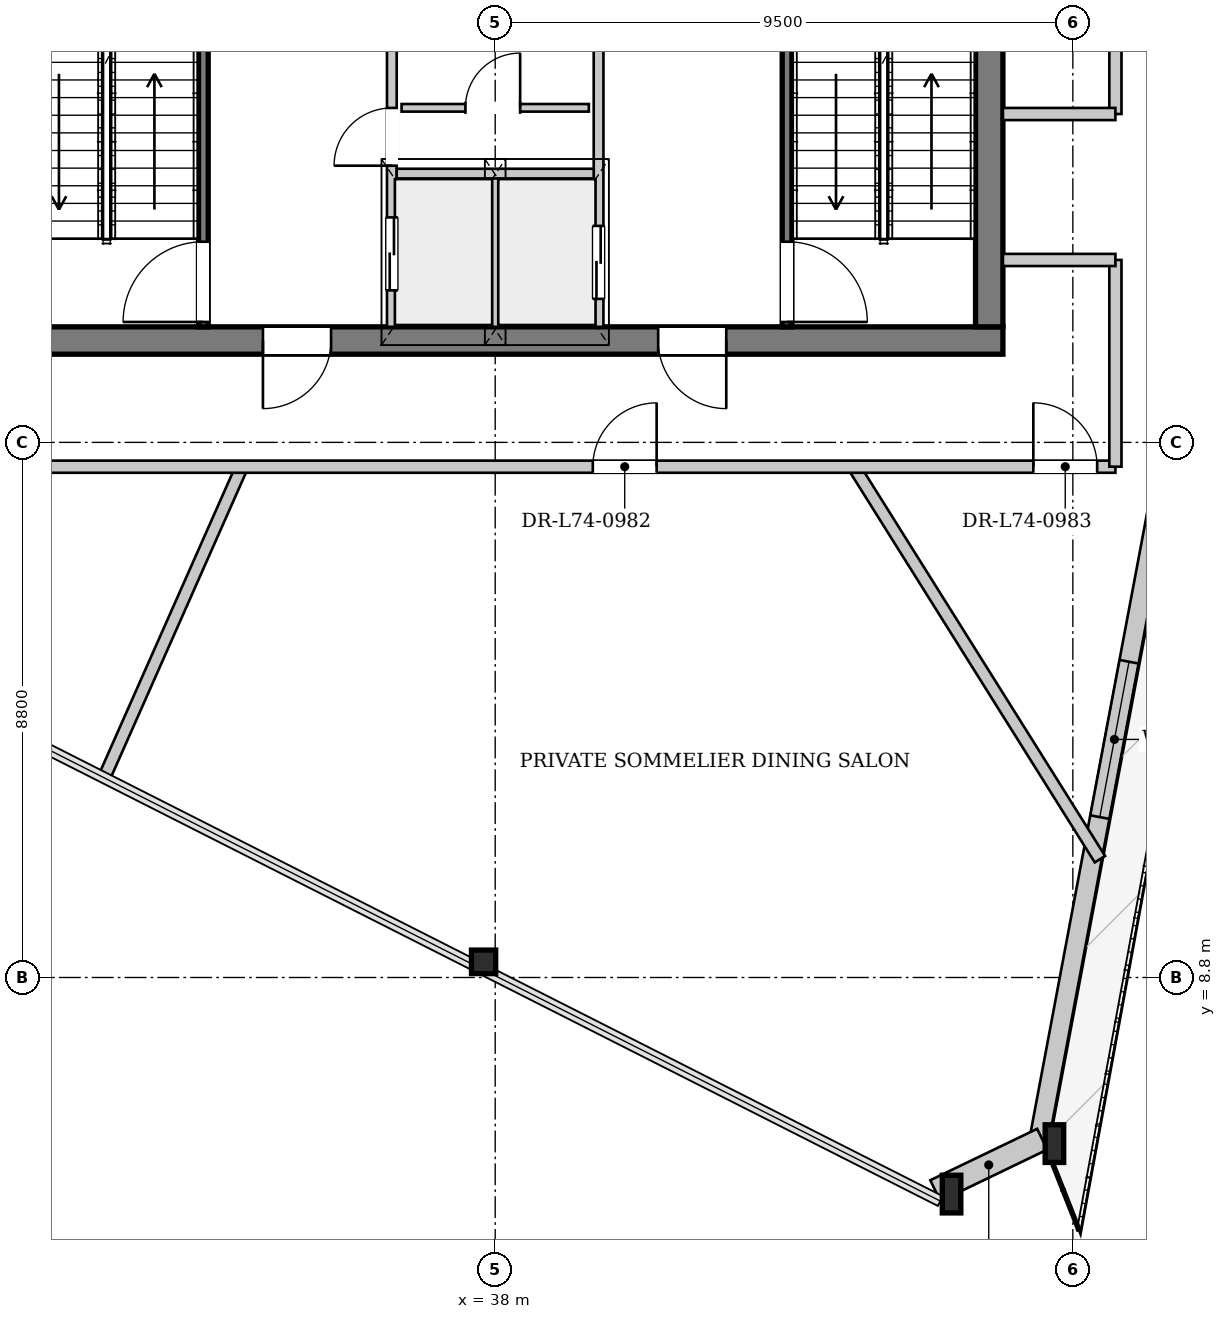
"""IFC4 building model, lengths in metres.
Left out: names, types, materials, properties, quantities, classifications, styles, units other than length and angle.
Written with IfcOpenShell. Run it as: python <this file> out.ifc"""

import sys

from ifc_helpers import new_model, si_unit, direction, frame, frame_2d, origin, origin_2d, place, context, subcontext, project, spatial, rectangle, i_section, extrude, source, transform, mapped, element, fill, save


model = new_model("IFC4")
c1 = context("Model", 3, precision=1e-05, world=origin(), true_north=direction((0.0, 1.0)))
c2 = subcontext(c1, "Body", "Model", "MODEL_VIEW")
j1 = project(units=[si_unit("LENGTHUNIT", "METRE"), si_unit("PLANEANGLEUNIT", "RADIAN")], contexts=[c1])
p1 = place(None, origin())
s1 = spatial("IfcSite", under=j1, at=p1, CompositionType="ELEMENT")
p2 = place(p1, origin())
s2 = spatial("IfcBuilding", under=s1, at=p2, CompositionType="ELEMENT")
p3 = place(p2, frame((0.0, 0.0, 277.7)))
s3 = spatial("IfcBuildingStorey", under=s2, at=p3, CompositionType="ELEMENT", Elevation=277.7)
m1 = source(origin(), c2, "Body", "SweptSolid", [
    extrude(i_section(OverallWidth=0.398, OverallDepth=0.387, WebThickness=0.019, FlangeThickness=0.029, at=origin_2d()), origin(), (0.0, 0.0, 1.0), 3.949),
])
p4 = place(p3, frame((37.649, 9.006, 0.0), z_axis=(0.081104376536, 0.025777839189, 0.996372211131), x_axis=(-0.302903819807, 0.953021130902, 0.0)))
e1 = element("IfcColumn", 1, at=p4, inside=s3, PredefinedType="COLUMN", context=c2, shape_type="MappedRepresentation", body=[
    mapped(m1, transform((0.0, 0.0, 0.0), x_axis=(1.0, 0.0, 0.0), y_axis=(0.0, 1.0, 0.0), z_axis=(0.0, 0.0, 1.0), scale=1.0)),
])
m2 = source(origin(), c2, "Body", "SweptSolid", [
    extrude(i_section(OverallWidth=0.305, OverallDepth=0.62, WebThickness=0.021, FlangeThickness=0.04, at=origin_2d()), origin(), (0.0, 0.0, 1.0), 3.959),
])
p5 = place(p3, frame((45.321, 5.123, 0.0), z_axis=(0.093241063797, 0.057967328022, 0.993954673466), x_axis=(-0.527977918336, 0.84925809843, 0.0)))
e2 = element("IfcColumn", 2, at=p5, inside=s3, PredefinedType="COLUMN", context=c2, shape_type="MappedRepresentation", body=[
    mapped(m2, transform((0.0, 0.0, 0.0), x_axis=(1.0, 0.0, 0.0), y_axis=(0.0, 1.0, 0.0), z_axis=(0.0, 0.0, 1.0), scale=1.0)),
])
m3 = source(origin(), c2, "Body", "SweptSolid", [
    extrude(i_section(OverallWidth=0.305, OverallDepth=0.62, WebThickness=0.021, FlangeThickness=0.04, at=origin_2d()), origin(), (0.0, 0.0, 1.0), 3.947),
])
p6 = place(p3, frame((47.078, 5.969, 0.0), z_axis=(0.060366430178, 0.050222890681, 0.996912009838), x_axis=(-0.639564408319, 0.768737515418, 0.0)))
e3 = element("IfcColumn", 3, at=p6, inside=s3, PredefinedType="COLUMN", context=c2, shape_type="MappedRepresentation", body=[
    mapped(m3, transform((0.0, 0.0, 0.0), x_axis=(1.0, 0.0, 0.0), y_axis=(0.0, 1.0, 0.0), z_axis=(0.0, 0.0, 1.0), scale=1.0)),
])
p7 = place(p3, frame((50.997, 27.672, 0.0), z_axis=(0.0, 0.0, 1.0), x_axis=(-0.184819886047, -0.982772409931, 0.0)))
e4 = element("IfcWall", 4, at=p7, inside=s3, PredefinedType="SOLIDWALL", context=c2, shape_type="SweptSolid", body=[
    extrude(rectangle(XDim=22.053, YDim=0.32, at=frame_2d((11.027, 0.0))), origin(), (0.0, 0.0, 1.0), 3.462),
])
p8 = place(p7, frame((6.307, 0.0, 0.0)))
e5 = element("IfcOpeningElement", 5, at=p8, cuts=e4, PredefinedType="OPENING", context=c2, shape_type="SweptSolid", body=[
    extrude(rectangle(XDim=1.5, YDim=2.3, at=frame_2d((0.75, 1.15))), frame((0.0, 0.17, 0.0), z_axis=(0.0, -1.0, 0.0), x_axis=(1.0, 0.0, 0.0)), (0.0, 0.0, 1.0), 0.34),
])
p9 = place(p7, frame((13.919, 0.0, 0.65)))
e6 = element("IfcOpeningElement", 6, at=p9, cuts=e4, PredefinedType="OPENING", context=c2, shape_type="SweptSolid", body=[
    extrude(rectangle(XDim=2.6, YDim=2.35, at=frame_2d((1.3, 1.175))), frame((0.0, 0.17, 0.0), z_axis=(0.0, -1.0, 0.0), x_axis=(1.0, 0.0, 0.0)), (0.0, 0.0, 1.0), 0.34),
])
p10 = place(p3, frame((46.996, 6.14, 0.0), z_axis=(0.0, 0.0, 1.0), x_axis=(-0.901133930153, -0.43354081691, 0.0)))
e7 = element("IfcWall", 7, at=p10, inside=s3, PredefinedType="SOLIDWALL", context=c2, shape_type="SweptSolid", body=[
    extrude(rectangle(XDim=1.95, YDim=0.38, at=frame_2d((0.975, 0.0))), origin(), (0.0, 0.0, 1.0), 3.462),
])
p11 = place(p3, frame((46.35, 19.275, 0.0), z_axis=(0.0, 0.0, 1.0), x_axis=(-1.0, 0.0, 0.0)))
e8 = element("IfcWall", 8, at=p11, inside=s3, PredefinedType="SHEAR", context=c2, shape_type="SweptSolid", body=[
    extrude(rectangle(XDim=16.7, YDim=0.45, at=frame_2d((8.35, 0.0))), origin(), (0.0, 0.0, 1.0), 3.92),
])
p12 = place(p11, frame((4.55, 0.0, 0.0)))
e9 = element("IfcOpeningElement", 9, at=p12, cuts=e8, PredefinedType="OPENING", context=c2, shape_type="SweptSolid", body=[
    extrude(rectangle(XDim=1.12, YDim=2.25, at=frame_2d((0.56, 1.125))), frame((0.0, 0.235, 0.0), z_axis=(0.0, -1.0, 0.0), x_axis=(1.0, 0.0, 0.0)), (0.0, 0.0, 1.0), 0.47),
])
p13 = place(p11, frame((11.05, 0.0, 0.0)))
e10 = element("IfcOpeningElement", 10, at=p13, cuts=e8, PredefinedType="OPENING", context=c2, shape_type="SweptSolid", body=[
    extrude(rectangle(XDim=1.12, YDim=2.25, at=frame_2d((0.56, 1.125))), frame((0.0, 0.235, 0.0), z_axis=(0.0, -1.0, 0.0), x_axis=(1.0, 0.0, 0.0)), (0.0, 0.0, 1.0), 0.47),
])
p14 = place(p3, frame((46.125, 33.7, 0.0), z_axis=(0.0, 0.0, 1.0), x_axis=(0.0, -1.0, 0.0)))
e11 = element("IfcWall", 11, at=p14, inside=s3, PredefinedType="SHEAR", context=c2, shape_type="SweptSolid", body=[
    extrude(rectangle(XDim=14.2, YDim=0.45, at=frame_2d((7.1, 0.0))), origin(), (0.0, 0.0, 1.0), 3.92),
])
p15 = place(p14, frame((5.18, 0.0, 0.0)))
e12 = element("IfcOpeningElement", 12, at=p15, cuts=e11, PredefinedType="OPENING", context=c2, shape_type="SweptSolid", body=[
    extrude(rectangle(XDim=1.6, YDim=2.2, at=frame_2d((0.8, 1.1))), frame((0.0, 0.235, 0.0), z_axis=(0.0, -1.0, 0.0), x_axis=(1.0, 0.0, 0.0)), (0.0, 0.0, 1.0), 0.47),
])
p16 = place(p14, frame((2.05, 0.0, 0.0)))
e13 = element("IfcOpeningElement", 13, at=p16, cuts=e11, PredefinedType="OPENING", context=c2, shape_type="SweptSolid", body=[
    extrude(rectangle(XDim=0.95, YDim=2.1, at=frame_2d((0.475, 1.05))), frame((0.0, 0.235, 0.0), z_axis=(0.0, -1.0, 0.0), x_axis=(1.0, 0.0, 0.0)), (0.0, 0.0, 1.0), 0.47),
])
p17 = place(p3, frame((33.2, 19.5, 0.0), z_axis=(0.0, 0.0, 1.0), x_axis=(0.0, 1.0, 0.0)))
e14 = element("IfcWall", 14, at=p17, inside=s3, PredefinedType="PARTITIONING", context=c2, shape_type="SweptSolid", body=[
    extrude(rectangle(XDim=7.46, YDim=0.16, at=frame_2d((3.73, 0.0))), origin(), (0.0, 0.0, 1.0), 3.92),
])
p18 = place(p17, frame((0.08, 0.0, 0.0)))
e15 = element("IfcOpeningElement", 15, at=p18, cuts=e14, PredefinedType="OPENING", context=c2, shape_type="SweptSolid", body=[
    extrude(rectangle(XDim=1.32, YDim=2.2, at=frame_2d((0.66, 1.1))), frame((0.0, 0.09, 0.0), z_axis=(0.0, -1.0, 0.0), x_axis=(1.0, 0.0, 0.0)), (0.0, 0.0, 1.0), 0.18),
])
p19 = place(p3, frame((42.8, 26.96, 0.0), z_axis=(0.0, 0.0, 1.0), x_axis=(0.0, -1.0, 0.0)))
e16 = element("IfcWall", 16, at=p19, inside=s3, PredefinedType="PARTITIONING", context=c2, shape_type="SweptSolid", body=[
    extrude(rectangle(XDim=7.46, YDim=0.16, at=frame_2d((3.73, 0.0))), origin(), (0.0, 0.0, 1.0), 3.92),
])
p20 = place(p19, frame((6.06, 0.0, 0.0)))
e17 = element("IfcOpeningElement", 17, at=p20, cuts=e16, PredefinedType="OPENING", context=c2, shape_type="SweptSolid", body=[
    extrude(rectangle(XDim=1.32, YDim=2.2, at=frame_2d((0.66, 1.1))), frame((0.0, 0.09, 0.0), z_axis=(0.0, -1.0, 0.0), x_axis=(1.0, 0.0, 0.0)), (0.0, 0.0, 1.0), 0.18),
])
p21 = place(p3, frame((36.3, 19.5, 0.0), z_axis=(0.0, 0.0, 1.0), x_axis=(0.0, 1.0, 0.0)))
e18 = element("IfcWall", 18, at=p21, inside=s3, PredefinedType="PARTITIONING", context=c2, shape_type="SweptSolid", body=[
    extrude(rectangle(XDim=4.78, YDim=0.16, at=frame_2d((2.39, 0.0))), origin(), (0.0, 0.0, 1.0), 3.92),
])
p22 = place(p21, frame((0.6, 0.0, 0.0)))
e19 = element("IfcOpeningElement", 19, at=p22, cuts=e18, PredefinedType="OPENING", context=c2, shape_type="SweptSolid", body=[
    extrude(rectangle(XDim=1.2, YDim=2.2, at=frame_2d((0.6, 1.1))), frame((0.0, 0.09, 0.0), z_axis=(0.0, -1.0, 0.0), x_axis=(1.0, 0.0, 0.0)), (0.0, 0.0, 1.0), 0.18),
])
p23 = place(p21, frame((2.65, 0.0, 0.0)))
e20 = element("IfcOpeningElement", 20, at=p23, cuts=e18, PredefinedType="OPENING", context=c2, shape_type="SweptSolid", body=[
    extrude(rectangle(XDim=0.95, YDim=2.1, at=frame_2d((0.475, 1.05))), frame((0.0, 0.09, 0.0), z_axis=(0.0, -1.0, 0.0), x_axis=(1.0, 0.0, 0.0)), (0.0, 0.0, 1.0), 0.18),
])
p24 = place(p3, frame((39.7, 24.28, 0.0), z_axis=(0.0, 0.0, 1.0), x_axis=(0.0, -1.0, 0.0)))
e21 = element("IfcWall", 21, at=p24, inside=s3, PredefinedType="PARTITIONING", context=c2, shape_type="SweptSolid", body=[
    extrude(rectangle(XDim=4.78, YDim=0.16, at=frame_2d((2.39, 0.0))), origin(), (0.0, 0.0, 1.0), 3.92),
])
p25 = place(p24, frame((3.12, 0.0, 0.0)))
e22 = element("IfcOpeningElement", 22, at=p25, cuts=e21, PredefinedType="OPENING", context=c2, shape_type="SweptSolid", body=[
    extrude(rectangle(XDim=1.2, YDim=2.2, at=frame_2d((0.6, 1.1))), frame((0.0, 0.09, 0.0), z_axis=(0.0, -1.0, 0.0), x_axis=(1.0, 0.0, 0.0)), (0.0, 0.0, 1.0), 0.18),
])
p26 = place(p3, frame((38.0, 19.5, 0.0), z_axis=(0.0, 0.0, 1.0), x_axis=(0.0, 1.0, 0.0)))
e23 = element("IfcWall", 23, at=p26, inside=s3, PredefinedType="PARTITIONING", context=c2, shape_type="SweptSolid", body=[
    extrude(rectangle(XDim=2.46, YDim=0.125, at=frame_2d((1.23, 0.0))), origin(), (0.0, 0.0, 1.0), 3.92),
])
p27 = place(p3, frame((36.38, 22.02, 0.0), z_axis=(0.0, 0.0, 1.0), x_axis=(1.0, 0.0, 0.0)))
e24 = element("IfcWall", 24, at=p27, inside=s3, PredefinedType="PARTITIONING", context=c2, shape_type="SweptSolid", body=[
    extrude(rectangle(XDim=3.24, YDim=0.16, at=frame_2d((1.62, 0.0))), origin(), (0.0, 0.0, 1.0), 3.92),
])
p28 = place(p3, frame((36.46, 23.102, 0.0), z_axis=(0.0, 0.0, 1.0), x_axis=(1.0, 0.0, 0.0)))
e25 = element("IfcWall", 25, at=p28, inside=s3, PredefinedType="PARTITIONING", context=c2, shape_type="SweptSolid", body=[
    extrude(rectangle(XDim=3.08, YDim=0.125, at=frame_2d((1.54, 0.0))), origin(), (0.0, 0.0, 1.0), 3.92),
])
p29 = place(p28, frame((1.05, 0.0, 0.0)))
e26 = element("IfcOpeningElement", 26, at=p29, cuts=e25, PredefinedType="OPENING", context=c2, shape_type="SweptSolid", body=[
    extrude(rectangle(XDim=0.9, YDim=2.1, at=frame_2d((0.45, 1.05))), frame((0.0, 0.073, 0.0), z_axis=(0.0, -1.0, 0.0), x_axis=(1.0, 0.0, 0.0)), (0.0, 0.0, 1.0), 0.145),
])
p30 = place(p3, frame((33.834, 17.2, 0.0), z_axis=(0.0, 0.0, 1.0), x_axis=(-0.405145139192, -0.914252381014, 0.0)))
e27 = element("IfcWall", 27, at=p30, inside=s3, PredefinedType="PARTITIONING", context=c2, shape_type="SweptSolid", body=[
    extrude(rectangle(XDim=5.566, YDim=0.2, at=frame_2d((2.783, 0.0))), origin(), (0.0, 0.0, 1.0), 3.92),
])
p31 = place(p3, frame((43.896, 17.2, 0.0), z_axis=(0.0, 0.0, 1.0), x_axis=(0.531409475287, -0.847115086382, 0.0)))
e28 = element("IfcWall", 28, at=p31, inside=s3, PredefinedType="PARTITIONING", context=c2, shape_type="SweptSolid", body=[
    extrude(rectangle(XDim=7.619, YDim=0.2, at=frame_2d((3.81, 0.0))), origin(), (0.0, 0.0, 1.0), 3.92),
])
p32 = place(p3, frame((27.8, 17.2, 0.0), z_axis=(0.0, 0.0, 1.0), x_axis=(1.0, 0.0, 0.0)))
e29 = element("IfcWall", 29, at=p32, inside=s3, PredefinedType="PARTITIONING", context=c2, shape_type="SweptSolid", body=[
    extrude(rectangle(XDim=20.4, YDim=0.2, at=frame_2d((10.2, 0.0))), origin(), (0.0, 0.0, 1.0), 3.92),
])
p33 = place(p32, frame((0.3, 0.0, 0.0)))
e30 = element("IfcOpeningElement", 30, at=p33, cuts=e29, PredefinedType="OPENING", context=c2, shape_type="SweptSolid", body=[
    extrude(rectangle(XDim=1.05, YDim=2.2, at=frame_2d((0.525, 1.1))), frame((0.0, 0.11, 0.0), z_axis=(0.0, -1.0, 0.0), x_axis=(1.0, 0.0, 0.0)), (0.0, 0.0, 1.0), 0.22),
])
p34 = place(p32, frame((11.805, 0.0, 0.0)))
e31 = element("IfcOpeningElement", 31, at=p34, cuts=e29, PredefinedType="OPENING", context=c2, shape_type="SweptSolid", body=[
    extrude(rectangle(XDim=1.05, YDim=2.2, at=frame_2d((0.525, 1.1))), frame((0.0, 0.11, 0.0), z_axis=(0.0, -1.0, 0.0), x_axis=(1.0, 0.0, 0.0)), (0.0, 0.0, 1.0), 0.22),
])
p35 = place(p32, frame((19.05, 0.0, 0.0)))
e32 = element("IfcOpeningElement", 32, at=p35, cuts=e29, PredefinedType="OPENING", context=c2, shape_type="SweptSolid", body=[
    extrude(rectangle(XDim=1.05, YDim=2.2, at=frame_2d((0.525, 1.1))), frame((0.0, 0.11, 0.0), z_axis=(0.0, -1.0, 0.0), x_axis=(1.0, 0.0, 0.0)), (0.0, 0.0, 1.0), 0.22),
])
p36 = place(p3, frame((48.2, 17.2, 0.0), z_axis=(0.0, 0.0, 1.0), x_axis=(0.0, 1.0, 0.0)))
e33 = element("IfcWall", 33, at=p36, inside=s3, PredefinedType="PARTITIONING", context=c2, shape_type="SweptSolid", body=[
    extrude(rectangle(XDim=3.4, YDim=0.2, at=frame_2d((1.7, 0.0))), origin(), (0.0, 0.0, 1.0), 3.92),
])
p37 = place(p3, frame((46.35, 20.6, 0.0), z_axis=(0.0, 0.0, 1.0), x_axis=(1.0, 0.0, 0.0)))
e34 = element("IfcWall", 34, at=p37, inside=s3, PredefinedType="PARTITIONING", context=c2, shape_type="SweptSolid", body=[
    extrude(rectangle(XDim=1.85, YDim=0.2, at=frame_2d((0.925, 0.0))), origin(), (0.0, 0.0, 1.0), 3.92),
])
p38 = place(p3, frame((48.2, 23.0, 0.0), z_axis=(0.0, 0.0, 1.0), x_axis=(0.0, 1.0, 0.0)))
e35 = element("IfcWall", 35, at=p38, inside=s3, PredefinedType="PARTITIONING", context=c2, shape_type="SweptSolid", body=[
    extrude(rectangle(XDim=13.0, YDim=0.2, at=frame_2d((6.5, 0.0))), origin(), (0.0, 0.0, 1.0), 3.605),
])
p39 = place(p38, frame((6.366, 0.0, 0.0)))
e36 = element("IfcOpeningElement", 36, at=p39, cuts=e35, PredefinedType="OPENING", context=c2, shape_type="SweptSolid", body=[
    extrude(rectangle(XDim=1.05, YDim=2.2, at=frame_2d((0.525, 1.1))), frame((0.0, 0.11, 0.0), z_axis=(0.0, -1.0, 0.0), x_axis=(1.0, 0.0, 0.0)), (0.0, 0.0, 1.0), 0.22),
])
p40 = place(p38, frame((11.65, 0.0, 0.0)))
e37 = element("IfcOpeningElement", 37, at=p40, cuts=e35, PredefinedType="OPENING", context=c2, shape_type="SweptSolid", body=[
    extrude(rectangle(XDim=1.05, YDim=2.2, at=frame_2d((0.525, 1.1))), frame((0.0, 0.11, 0.0), z_axis=(0.0, -1.0, 0.0), x_axis=(1.0, 0.0, 0.0)), (0.0, 0.0, 1.0), 0.22),
])
p41 = place(p3, frame((46.35, 23.0, 0.0), z_axis=(0.0, 0.0, 1.0), x_axis=(1.0, 0.0, 0.0)))
e38 = element("IfcWall", 38, at=p41, inside=s3, PredefinedType="PARTITIONING", context=c2, shape_type="SweptSolid", body=[
    extrude(rectangle(XDim=1.85, YDim=0.2, at=frame_2d((0.925, 0.0))), origin(), (0.0, 0.0, 1.0), 3.92),
])
m4 = source(origin(), c2, "Body", "SweptSolid", [
    extrude(rectangle(XDim=2.6, YDim=2.35, at=frame_2d((1.3, 1.175))), frame((0.0, 0.03, 0.0), z_axis=(0.0, -1.0, 0.0), x_axis=(1.0, 0.0, 0.0)), (0.0, 0.0, 1.0), 0.06),
])
p42 = place(p9, origin())
e39 = element("IfcWindow", 39, at=p42, inside=s3, PartitioningType="SINGLE_PANEL", PredefinedType="WINDOW", context=c2, shape_type="MappedRepresentation", body=[
    mapped(m4, transform((0.0, 0.0, 0.0), x_axis=(1.0, 0.0, 0.0), y_axis=(0.0, 1.0, 0.0), z_axis=(0.0, 0.0, 1.0), scale=1.0)),
])
fill(e6, e39)
m5 = source(origin(), c2, "Body", "SweptSolid", [
    extrude(rectangle(XDim=1.12, YDim=2.25, at=frame_2d((0.56, 1.125))), frame((0.0, 0.025, 0.0), z_axis=(0.0, -1.0, 0.0), x_axis=(1.0, 0.0, 0.0)), (0.0, 0.0, 1.0), 0.05),
])
p43 = place(p12, origin())
e40 = element("IfcDoor", 40, at=p43, inside=s3, OperationType="SINGLE_SWING_LEFT", PredefinedType="DOOR", context=c2, shape_type="MappedRepresentation", body=[
    mapped(m5, transform((0.0, 0.0, 0.0), x_axis=(1.0, 0.0, 0.0), y_axis=(0.0, 1.0, 0.0), z_axis=(0.0, 0.0, 1.0), scale=1.0)),
])
fill(e9, e40)
p44 = place(p13, origin())
e41 = element("IfcDoor", 41, at=p44, inside=s3, OperationType="SINGLE_SWING_RIGHT", PredefinedType="DOOR", context=c2, shape_type="MappedRepresentation", body=[
    mapped(m5, transform((0.0, 0.0, 0.0), x_axis=(1.0, 0.0, 0.0), y_axis=(0.0, 1.0, 0.0), z_axis=(0.0, 0.0, 1.0), scale=1.0)),
])
fill(e10, e41)
m6 = source(origin(), c2, "Body", "SweptSolid", [
    extrude(rectangle(XDim=1.32, YDim=2.2, at=frame_2d((0.66, 1.1))), frame((0.0, 0.025, 0.0), z_axis=(0.0, -1.0, 0.0), x_axis=(1.0, 0.0, 0.0)), (0.0, 0.0, 1.0), 0.05),
])
p45 = place(p18, origin())
e42 = element("IfcDoor", 42, at=p45, inside=s3, OperationType="SINGLE_SWING_LEFT", PredefinedType="DOOR", context=c2, shape_type="MappedRepresentation", body=[
    mapped(m6, transform((0.0, 0.0, 0.0), x_axis=(1.0, 0.0, 0.0), y_axis=(0.0, 1.0, 0.0), z_axis=(0.0, 0.0, 1.0), scale=1.0)),
])
fill(e15, e42)
p46 = place(p20, origin())
e43 = element("IfcDoor", 43, at=p46, inside=s3, OperationType="SINGLE_SWING_RIGHT", PredefinedType="DOOR", context=c2, shape_type="MappedRepresentation", body=[
    mapped(m6, transform((0.0, 0.0, 0.0), x_axis=(1.0, 0.0, 0.0), y_axis=(0.0, 1.0, 0.0), z_axis=(0.0, 0.0, 1.0), scale=1.0)),
])
fill(e17, e43)
m7 = source(origin(), c2, "Body", "SweptSolid", [
    extrude(rectangle(XDim=1.2, YDim=2.2, at=frame_2d((0.6, 1.1))), frame((0.0, 0.025, 0.0), z_axis=(0.0, -1.0, 0.0), x_axis=(1.0, 0.0, 0.0)), (0.0, 0.0, 1.0), 0.05),
])
p47 = place(p22, origin())
e44 = element("IfcDoor", 44, at=p47, inside=s3, OperationType="DOUBLE_DOOR_SLIDING", PredefinedType="DOOR", context=c2, shape_type="MappedRepresentation", body=[
    mapped(m7, transform((0.0, 0.0, 0.0), x_axis=(1.0, 0.0, 0.0), y_axis=(0.0, 1.0, 0.0), z_axis=(0.0, 0.0, 1.0), scale=1.0)),
])
fill(e19, e44)
m8 = source(origin(), c2, "Body", "SweptSolid", [
    extrude(rectangle(XDim=0.95, YDim=2.1, at=frame_2d((0.475, 1.05))), frame((0.0, 0.025, 0.0), z_axis=(0.0, -1.0, 0.0), x_axis=(1.0, 0.0, 0.0)), (0.0, 0.0, 1.0), 0.05),
])
p48 = place(p23, origin())
e45 = element("IfcDoor", 45, at=p48, inside=s3, OperationType="SINGLE_SWING_LEFT", PredefinedType="DOOR", context=c2, shape_type="MappedRepresentation", body=[
    mapped(m8, transform((0.0, 0.0, 0.0), x_axis=(1.0, 0.0, 0.0), y_axis=(0.0, 1.0, 0.0), z_axis=(0.0, 0.0, 1.0), scale=1.0)),
])
fill(e20, e45)
m9 = source(origin(), c2, "Body", "SweptSolid", [
    extrude(rectangle(XDim=0.9, YDim=2.1, at=frame_2d((0.45, 1.05))), frame((0.0, 0.025, 0.0), z_axis=(0.0, -1.0, 0.0), x_axis=(1.0, 0.0, 0.0)), (0.0, 0.0, 1.0), 0.05),
])
p49 = place(p29, origin())
e46 = element("IfcDoor", 46, at=p49, inside=s3, OperationType="SINGLE_SWING_RIGHT", PredefinedType="DOOR", context=c2, shape_type="MappedRepresentation", body=[
    mapped(m9, transform((0.0, 0.0, 0.0), x_axis=(1.0, 0.0, 0.0), y_axis=(0.0, 1.0, 0.0), z_axis=(0.0, 0.0, 1.0), scale=1.0)),
])
fill(e26, e46)
p50 = place(p25, origin())
e47 = element("IfcDoor", 47, at=p50, inside=s3, OperationType="DOUBLE_DOOR_SLIDING", PredefinedType="DOOR", context=c2, shape_type="MappedRepresentation", body=[
    mapped(m7, transform((0.0, 0.0, 0.0), x_axis=(1.0, 0.0, 0.0), y_axis=(0.0, 1.0, 0.0), z_axis=(0.0, 0.0, 1.0), scale=1.0)),
])
fill(e22, e47)
m10 = source(origin(), c2, "Body", "SweptSolid", [
    extrude(rectangle(XDim=1.05, YDim=2.2, at=frame_2d((0.525, 1.1))), frame((0.0, 0.025, 0.0), z_axis=(0.0, -1.0, 0.0), x_axis=(1.0, 0.0, 0.0)), (0.0, 0.0, 1.0), 0.05),
])
p51 = place(p34, origin())
e48 = element("IfcDoor", 48, at=p51, inside=s3, OperationType="SINGLE_SWING_RIGHT", PredefinedType="DOOR", context=c2, shape_type="MappedRepresentation", body=[
    mapped(m10, transform((0.0, 0.0, 0.0), x_axis=(1.0, 0.0, 0.0), y_axis=(0.0, 1.0, 0.0), z_axis=(0.0, 0.0, 1.0), scale=1.0)),
])
fill(e31, e48)
p52 = place(p35, origin())
e49 = element("IfcDoor", 49, at=p52, inside=s3, OperationType="SINGLE_SWING_LEFT", PredefinedType="DOOR", context=c2, shape_type="MappedRepresentation", body=[
    mapped(m10, transform((0.0, 0.0, 0.0), x_axis=(1.0, 0.0, 0.0), y_axis=(0.0, 1.0, 0.0), z_axis=(0.0, 0.0, 1.0), scale=1.0)),
])
fill(e32, e49)
save(model, sys.argv[1])
